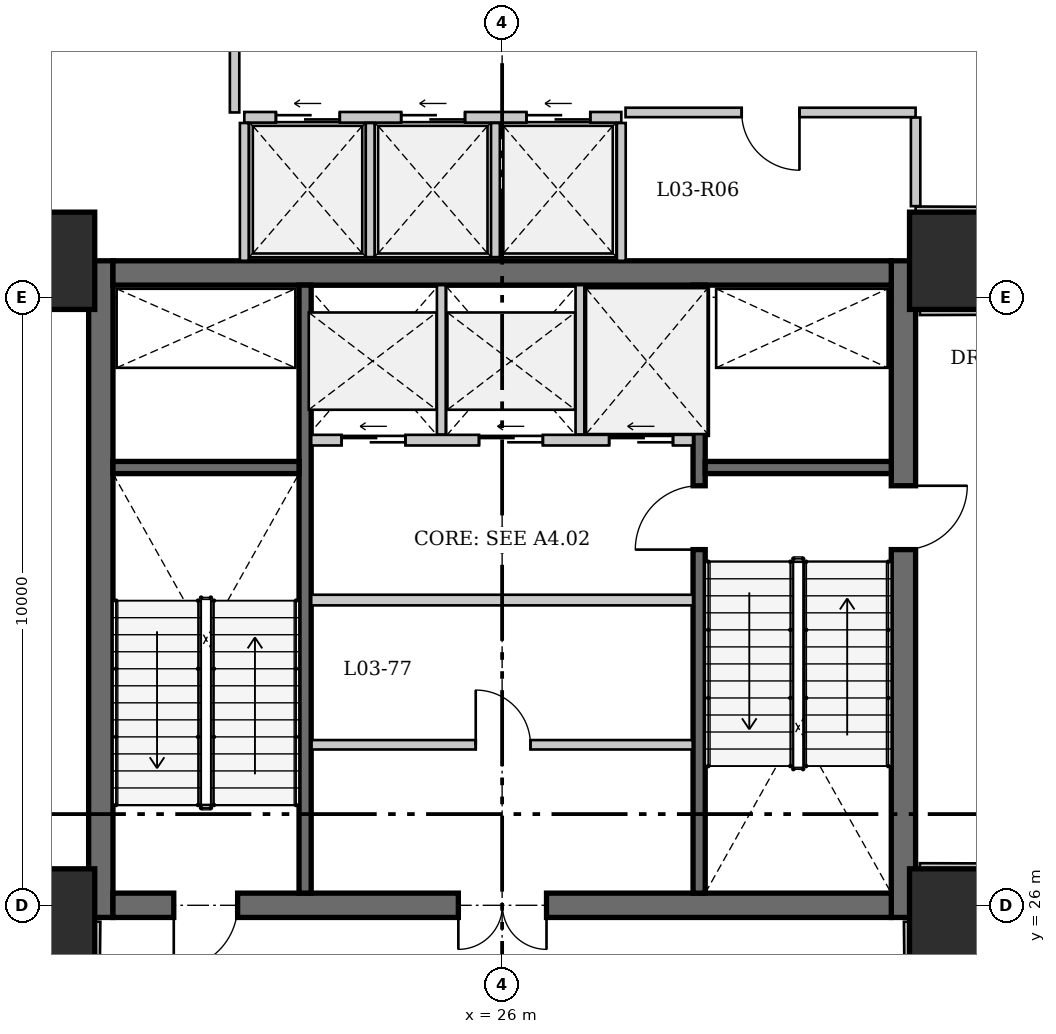
"""IFC4 building model, lengths in metres.
Left out: names, types, materials, properties, quantities, classifications, styles, units other than length and angle.
Written with IfcOpenShell. Run it as: python <this file> out.ifc"""

import sys

from ifc_helpers import new_model, si_unit, direction, frame, frame_2d, origin, origin_2d, place, context, subcontext, project, spatial, rectangle, extrude, source, transform, mapped, element, fill, save


model = new_model("IFC4")
c1 = context("Model", 3, precision=1e-05, world=origin(), true_north=direction((0.0, 1.0)))
c2 = subcontext(c1, "Body", "Model", "MODEL_VIEW")
j1 = project(units=[si_unit("LENGTHUNIT", "METRE"), si_unit("PLANEANGLEUNIT", "RADIAN")], contexts=[c1])
p1 = place(None, origin())
s1 = spatial("IfcSite", under=j1, at=p1, CompositionType="ELEMENT")
p2 = place(p1, origin())
s2 = spatial("IfcBuilding", under=s1, at=p2, CompositionType="ELEMENT")
p3 = place(p2, frame((0.0, 0.0, 14.4)))
s3 = spatial("IfcBuildingStorey", under=s2, at=p3, CompositionType="ELEMENT", Elevation=14.4)
for number, where, z_axis, x_axis in (
    (1, (18.5, 25.8, 0.0), (0.0, 0.0, 1.0), (1.0, 0.0, 0.0)),
    (2, (18.5, 36.6, 0.0), (0.0, 0.0, 1.0), (1.0, 0.0, 0.0)),
    (3, (33.5, 25.8, 0.0), (0.0, 0.0, 1.0), (1.0, 0.0, 0.0)),
    (4, (33.5, 36.6, 0.0), (0.0, 0.0, 1.0), (1.0, 0.0, 0.0)),
):
    element("IfcColumn", number, at=place(p3, frame(where, z_axis=z_axis, x_axis=x_axis)), inside=s3, PredefinedType="COLUMN", context=c2, shape_type="SweptSolid", body=[
        extrude(rectangle(XDim=1.6, YDim=1.6, at=origin_2d()), origin(), (0.0, 0.0, 1.0), 4.25),
    ])
p4 = place(p3, frame((19.4, 25.8, 0.0), z_axis=(0.0, 0.0, 1.0), x_axis=(0.0, 1.0, 0.0)))
e5 = element("IfcWall", 5, at=p4, inside=s3, PredefinedType="SHEAR", context=c2, shape_type="SweptSolid", body=[
    extrude(rectangle(XDim=10.8, YDim=0.4, at=frame_2d((5.4, 0.0))), origin(), (0.0, 0.0, 1.0), 4.6),
])
p5 = place(p3, frame((32.6, 36.6, 0.0), z_axis=(0.0, 0.0, 1.0), x_axis=(0.0, -1.0, 0.0)))
e6 = element("IfcWall", 6, at=p5, inside=s3, PredefinedType="SHEAR", context=c2, shape_type="SweptSolid", body=[
    extrude(rectangle(XDim=10.8, YDim=0.4, at=frame_2d((5.4, 0.0))), origin(), (0.0, 0.0, 1.0), 4.6),
])
p6 = place(p5, frame((3.7, 0.0, 0.0)))
e7 = element("IfcOpeningElement", 7, at=p6, cuts=e6, PredefinedType="OPENING", context=c2, shape_type="SweptSolid", body=[
    extrude(rectangle(XDim=1.05, YDim=2.15, at=frame_2d((0.525, 1.075))), frame((0.0, 0.21, 0.0), z_axis=(0.0, -1.0, 0.0), x_axis=(1.0, 0.0, 0.0)), (0.0, 0.0, 1.0), 0.42),
])
p7 = place(p3, frame((19.6, 36.4, 0.0), z_axis=(0.0, 0.0, 1.0), x_axis=(1.0, 0.0, 0.0)))
e8 = element("IfcWall", 8, at=p7, inside=s3, PredefinedType="SHEAR", context=c2, shape_type="SweptSolid", body=[
    extrude(rectangle(XDim=12.8, YDim=0.4, at=frame_2d((6.4, 0.0))), origin(), (0.0, 0.0, 1.0), 4.6),
])
p8 = place(p3, frame((32.4, 26.0, 0.0), z_axis=(0.0, 0.0, 1.0), x_axis=(-1.0, 0.0, 0.0)))
e9 = element("IfcWall", 9, at=p8, inside=s3, PredefinedType="SHEAR", context=c2, shape_type="SweptSolid", body=[
    extrude(rectangle(XDim=12.8, YDim=0.4, at=frame_2d((6.4, 0.0))), origin(), (0.0, 0.0, 1.0), 4.6),
])
p9 = place(p8, frame((10.75, 0.0, 0.0)))
e10 = element("IfcOpeningElement", 10, at=p9, cuts=e9, PredefinedType="OPENING", context=c2, shape_type="SweptSolid", body=[
    extrude(rectangle(XDim=1.05, YDim=2.15, at=frame_2d((0.525, 1.075))), frame((0.0, 0.21, 0.0), z_axis=(0.0, -1.0, 0.0), x_axis=(1.0, 0.0, 0.0)), (0.0, 0.0, 1.0), 0.42),
])
p10 = place(p8, frame((5.67, 0.0, 0.0)))
e11 = element("IfcOpeningElement", 11, at=p10, cuts=e9, PredefinedType="OPENING", context=c2, shape_type="SweptSolid", body=[
    extrude(rectangle(XDim=1.45, YDim=2.2, at=frame_2d((0.725, 1.1))), frame((0.0, 0.21, 0.0), z_axis=(0.0, -1.0, 0.0), x_axis=(1.0, 0.0, 0.0)), (0.0, 0.0, 1.0), 0.42),
])
p11 = place(p3, frame((22.76, 26.2, 0.0), z_axis=(0.0, 0.0, 1.0), x_axis=(0.0, 1.0, 0.0)))
e12 = element("IfcWall", 12, at=p11, inside=s3, PredefinedType="SHEAR", context=c2, shape_type="SweptSolid", body=[
    extrude(rectangle(XDim=10.0, YDim=0.2, at=frame_2d((5.0, 0.0))), origin(), (0.0, 0.0, 1.0), 4.6),
])
p12 = place(p3, frame((29.24, 26.2, 0.0), z_axis=(0.0, 0.0, 1.0), x_axis=(0.0, 1.0, 0.0)))
e13 = element("IfcWall", 13, at=p12, inside=s3, PredefinedType="SHEAR", context=c2, shape_type="SweptSolid", body=[
    extrude(rectangle(XDim=10.0, YDim=0.2, at=frame_2d((5.0, 0.0))), origin(), (0.0, 0.0, 1.0), 4.6),
])
p13 = place(p12, frame((5.65, 0.0, 0.0)))
e14 = element("IfcOpeningElement", 14, at=p13, cuts=e13, PredefinedType="OPENING", context=c2, shape_type="SweptSolid", body=[
    extrude(rectangle(XDim=1.05, YDim=2.15, at=frame_2d((0.525, 1.075))), frame((0.0, 0.11, 0.0), z_axis=(0.0, -1.0, 0.0), x_axis=(1.0, 0.0, 0.0)), (0.0, 0.0, 1.0), 0.22),
])
for number, where, z_axis, x_axis in (
    (15, (19.6, 33.2, 0.0), (0.0, 0.0, 1.0), (1.0, 0.0, 0.0)),
    (16, (29.34, 33.2, 0.0), (0.0, 0.0, 1.0), (1.0, 0.0, 0.0)),
):
    element("IfcWall", number, at=place(p3, frame(where, z_axis=z_axis, x_axis=x_axis)), inside=s3, PredefinedType="SHEAR", context=c2, shape_type="SweptSolid", body=[
        extrude(rectangle(XDim=3.06, YDim=0.2, at=frame_2d((1.53, 0.0))), origin(), (0.0, 0.0, 1.0), 4.6),
    ])
p14 = place(p3, frame((22.86, 33.65, 0.0), z_axis=(0.0, 0.0, 1.0), x_axis=(1.0, 0.0, 0.0)))
e17 = element("IfcWall", 17, at=p14, inside=s3, PredefinedType="SOLIDWALL", context=c2, shape_type="SweptSolid", body=[
    extrude(rectangle(XDim=6.28, YDim=0.175, at=frame_2d((3.14, 0.0))), origin(), (0.0, 0.0, 1.0), 4.25),
])
p15 = place(p14, frame((0.5, 0.0, 0.0)))
e18 = element("IfcOpeningElement", 18, at=p15, cuts=e17, PredefinedType="OPENING", context=c2, shape_type="SweptSolid", body=[
    extrude(rectangle(XDim=1.05, YDim=2.15, at=frame_2d((0.525, 1.075))), frame((0.0, 0.098, 0.0), z_axis=(0.0, -1.0, 0.0), x_axis=(1.0, 0.0, 0.0)), (0.0, 0.0, 1.0), 0.195),
])
p16 = place(p14, frame((2.76, 0.0, 0.0)))
e19 = element("IfcOpeningElement", 19, at=p16, cuts=e17, PredefinedType="OPENING", context=c2, shape_type="SweptSolid", body=[
    extrude(rectangle(XDim=1.05, YDim=2.15, at=frame_2d((0.525, 1.075))), frame((0.0, 0.098, 0.0), z_axis=(0.0, -1.0, 0.0), x_axis=(1.0, 0.0, 0.0)), (0.0, 0.0, 1.0), 0.195),
])
p17 = place(p14, frame((4.9, 0.0, 0.0)))
e20 = element("IfcOpeningElement", 20, at=p17, cuts=e17, PredefinedType="OPENING", context=c2, shape_type="SweptSolid", body=[
    extrude(rectangle(XDim=1.05, YDim=2.15, at=frame_2d((0.525, 1.075))), frame((0.0, 0.098, 0.0), z_axis=(0.0, -1.0, 0.0), x_axis=(1.0, 0.0, 0.0)), (0.0, 0.0, 1.0), 0.195),
])
for number, where, z_axis, x_axis in (
    (21, (25.0, 33.743, 0.0), (0.0, 0.0, 1.0), (0.0, 1.0, 0.0)),
    (22, (27.28, 33.743, 0.0), (0.0, 0.0, 1.0), (0.0, 1.0, 0.0)),
):
    element("IfcWall", number, at=place(p3, frame(where, z_axis=z_axis, x_axis=x_axis)), inside=s3, PredefinedType="SOLIDWALL", context=c2, shape_type="SweptSolid", body=[
        extrude(rectangle(XDim=2.457, YDim=0.145, at=frame_2d((1.228, 0.0))), origin(), (0.0, 0.0, 1.0), 4.25),
    ])
p18 = place(p3, frame((22.86, 31.02, 0.0), z_axis=(0.0, 0.0, 1.0), x_axis=(1.0, 0.0, 0.0)))
e23 = element("IfcWall", 23, at=p18, inside=s3, PredefinedType="SOLIDWALL", context=c2, shape_type="SweptSolid", body=[
    extrude(rectangle(XDim=6.28, YDim=0.175, at=frame_2d((3.14, 0.0))), origin(), (0.0, 0.0, 1.0), 4.25),
])
p19 = place(p3, frame((22.866, 28.64, 0.0), z_axis=(0.0, 0.0, 1.0), x_axis=(1.0, 0.0, 0.0)))
e24 = element("IfcWall", 24, at=p19, inside=s3, PredefinedType="PARTITIONING", context=c2, shape_type="SweptSolid", body=[
    extrude(rectangle(XDim=6.268, YDim=0.155, at=frame_2d((3.134, 0.0))), origin(), (0.0, 0.0, 1.0), 4.25),
])
p20 = place(p19, frame((2.7, 0.0, 0.0)))
e25 = element("IfcOpeningElement", 25, at=p20, cuts=e24, PredefinedType="OPENING", context=c2, shape_type="SweptSolid", body=[
    extrude(rectangle(XDim=0.9, YDim=2.1, at=frame_2d((0.45, 1.05))), frame((0.0, 0.087, 0.0), z_axis=(0.0, -1.0, 0.0), x_axis=(1.0, 0.0, 0.0)), (0.0, 0.0, 1.0), 0.175),
])
p21 = place(p3, frame((21.76, 38.96, 0.0), z_axis=(0.0, 0.0, 1.0), x_axis=(1.0, 0.0, 0.0)))
e26 = element("IfcWall", 26, at=p21, inside=s3, PredefinedType="SOLIDWALL", context=c2, shape_type="SweptSolid", body=[
    extrude(rectangle(XDim=6.2, YDim=0.175, at=frame_2d((3.1, 0.0))), origin(), (0.0, 0.0, 1.0), 4.25),
])
p22 = place(p21, frame((0.52, 0.0, 0.0)))
e27 = element("IfcOpeningElement", 27, at=p22, cuts=e26, PredefinedType="OPENING", context=c2, shape_type="SweptSolid", body=[
    extrude(rectangle(XDim=1.05, YDim=2.15, at=frame_2d((0.525, 1.075))), frame((0.0, 0.098, 0.0), z_axis=(0.0, -1.0, 0.0), x_axis=(1.0, 0.0, 0.0)), (0.0, 0.0, 1.0), 0.195),
])
p23 = place(p21, frame((2.58, 0.0, 0.0)))
e28 = element("IfcOpeningElement", 28, at=p23, cuts=e26, PredefinedType="OPENING", context=c2, shape_type="SweptSolid", body=[
    extrude(rectangle(XDim=1.05, YDim=2.15, at=frame_2d((0.525, 1.075))), frame((0.0, 0.098, 0.0), z_axis=(0.0, -1.0, 0.0), x_axis=(1.0, 0.0, 0.0)), (0.0, 0.0, 1.0), 0.195),
])
p24 = place(p21, frame((4.64, 0.0, 0.0)))
e29 = element("IfcOpeningElement", 29, at=p24, cuts=e26, PredefinedType="OPENING", context=c2, shape_type="SweptSolid", body=[
    extrude(rectangle(XDim=1.05, YDim=2.15, at=frame_2d((0.525, 1.075))), frame((0.0, 0.098, 0.0), z_axis=(0.0, -1.0, 0.0), x_axis=(1.0, 0.0, 0.0)), (0.0, 0.0, 1.0), 0.195),
])
for number, where, z_axis, x_axis in (
    (30, (21.76, 36.6, 0.0), (0.0, 0.0, 1.0), (0.0, 1.0, 0.0)),
    (31, (27.96, 36.6, 0.0), (0.0, 0.0, 1.0), (0.0, 1.0, 0.0)),
):
    element("IfcWall", number, at=place(p3, frame(where, z_axis=z_axis, x_axis=x_axis)), inside=s3, PredefinedType="SOLIDWALL", context=c2, shape_type="SweptSolid", body=[
        extrude(rectangle(XDim=2.266, YDim=0.145, at=frame_2d((1.133, 0.0))), origin(), (0.0, 0.0, 1.0), 4.25),
    ])
for number, where, z_axis, x_axis in (
    (32, (23.83, 36.66, 0.0), (0.0, 0.0, 1.0), (0.0, 1.0, 0.0)),
    (33, (25.89, 36.66, 0.0), (0.0, 0.0, 1.0), (0.0, 1.0, 0.0)),
):
    element("IfcWall", number, at=place(p3, frame(where, z_axis=z_axis, x_axis=x_axis)), inside=s3, PredefinedType="SOLIDWALL", context=c2, shape_type="SweptSolid", body=[
        extrude(rectangle(XDim=2.207, YDim=0.145, at=frame_2d((1.103, 0.0))), origin(), (0.0, 0.0, 1.0), 4.25),
    ])
p25 = place(p3, frame((32.8, 39.04, 0.0), z_axis=(0.0, 0.0, 1.0), x_axis=(-1.0, 0.0, 0.0)))
e34 = element("IfcWall", 34, at=p25, inside=s3, PredefinedType="PARTITIONING", context=c2, shape_type="SweptSolid", body=[
    extrude(rectangle(XDim=4.77, YDim=0.155, at=frame_2d((2.385, 0.0))), origin(), (0.0, 0.0, 1.0), 4.25),
])
p26 = place(p25, frame((1.91, 0.0, 0.0)))
e35 = element("IfcOpeningElement", 35, at=p26, cuts=e34, PredefinedType="OPENING", context=c2, shape_type="SweptSolid", body=[
    extrude(rectangle(XDim=0.95, YDim=2.15, at=frame_2d((0.475, 1.075))), frame((0.0, 0.087, 0.0), z_axis=(0.0, -1.0, 0.0), x_axis=(1.0, 0.0, 0.0)), (0.0, 0.0, 1.0), 0.175),
])
p27 = place(p3, frame((19.308, 25.07, 0.0), z_axis=(0.0, 0.0, 1.0), x_axis=(0.010362137944, 0.999946311607, 0.0)))
e36 = element("IfcWall", 36, at=p27, inside=s3, PredefinedType="PARTITIONING", context=c2, shape_type="SweptSolid", body=[
    extrude(rectangle(XDim=0.66, YDim=0.155, at=frame_2d((0.33, 0.0))), origin(), (0.0, 0.0, 1.0), 4.25),
])
p28 = place(p3, frame((32.685, 25.73, 0.0), z_axis=(0.0, 0.0, 1.0), x_axis=(0.010511902743, -0.999944748424, 0.0)))
e37 = element("IfcWall", 37, at=p28, inside=s3, PredefinedType="PARTITIONING", context=c2, shape_type="SweptSolid", body=[
    extrude(rectangle(XDim=0.743, YDim=0.155, at=frame_2d((0.372, 0.0))), origin(), (0.0, 0.0, 1.0), 4.25),
])
p29 = place(p3, frame((34.227, 26.611, 0.0), z_axis=(0.0, 0.0, 1.0), x_axis=(-0.999995856473, 0.002878721429, 0.0)))
e38 = element("IfcWall", 38, at=p29, inside=s3, PredefinedType="PARTITIONING", context=c2, shape_type="SweptSolid", body=[
    extrude(rectangle(XDim=1.357, YDim=0.155, at=frame_2d((0.678, 0.0))), origin(), (0.0, 0.0, 1.0), 4.25),
])
p30 = place(p3, frame((32.87, 35.785, 0.0), z_axis=(0.0, 0.0, 1.0), x_axis=(0.99999584892, 0.002881343971, 0.0)))
e39 = element("IfcWall", 39, at=p30, inside=s3, PredefinedType="PARTITIONING", context=c2, shape_type="SweptSolid", body=[
    extrude(rectangle(XDim=1.44, YDim=0.155, at=frame_2d((0.72, 0.0))), origin(), (0.0, 0.0, 1.0), 4.25),
])
p31 = place(p3, frame((34.228, 37.41, 0.0), z_axis=(0.0, 0.0, 1.0), x_axis=(-0.999993554729, 0.003590334185, 0.0)))
e40 = element("IfcWall", 40, at=p31, inside=s3, PredefinedType="PARTITIONING", context=c2, shape_type="SweptSolid", body=[
    extrude(rectangle(XDim=1.428, YDim=0.155, at=frame_2d((0.714, 0.0))), origin(), (0.0, 0.0, 1.0), 4.25),
])
p32 = place(p3, frame((32.8, 37.499, 0.0), z_axis=(0.0, 0.0, 1.0), x_axis=(0.0, 1.0, 0.0)))
e41 = element("IfcWall", 41, at=p32, inside=s3, PredefinedType="PARTITIONING", context=c2, shape_type="SweptSolid", body=[
    extrude(rectangle(XDim=1.458, YDim=0.155, at=frame_2d((0.729, 0.0))), origin(), (0.0, 0.0, 1.0), 4.25),
])
p33 = place(p3, frame((21.6, 39.04, 0.0), z_axis=(0.0, 0.0, 1.0), x_axis=(0.0, 1.0, 0.0)))
e42 = element("IfcWall", 42, at=p33, inside=s3, PredefinedType="PARTITIONING", context=c2, shape_type="SweptSolid", body=[
    extrude(rectangle(XDim=1.96, YDim=0.155, at=frame_2d((0.98, 0.0))), origin(), (0.0, 0.0, 1.0), 4.25),
])
m1 = source(origin(), c2, "Body", "SweptSolid", [
    extrude(rectangle(XDim=1.05, YDim=2.15, at=frame_2d((0.525, 1.075))), frame((0.0, 0.025, 0.0), z_axis=(0.0, -1.0, 0.0), x_axis=(1.0, 0.0, 0.0)), (0.0, 0.0, 1.0), 0.05),
])
p34 = place(p9, origin())
e43 = element("IfcDoor", 43, at=p34, inside=s3, OperationType="SINGLE_SWING_RIGHT", PredefinedType="DOOR", context=c2, shape_type="MappedRepresentation", body=[
    mapped(m1, transform((0.0, 0.0, 0.0), x_axis=(1.0, 0.0, 0.0), y_axis=(0.0, 1.0, 0.0), z_axis=(0.0, 0.0, 1.0), scale=1.0)),
])
fill(e10, e43)
m2 = source(origin(), c2, "Body", "SweptSolid", [
    extrude(rectangle(XDim=1.45, YDim=2.2, at=frame_2d((0.725, 1.1))), frame((0.0, 0.025, 0.0), z_axis=(0.0, -1.0, 0.0), x_axis=(1.0, 0.0, 0.0)), (0.0, 0.0, 1.0), 0.05),
])
p35 = place(p10, origin())
e44 = element("IfcDoor", 44, at=p35, inside=s3, OperationType="DOUBLE_DOOR_SINGLE_SWING", PredefinedType="DOOR", context=c2, shape_type="MappedRepresentation", body=[
    mapped(m2, transform((0.0, 0.0, 0.0), x_axis=(1.0, 0.0, 0.0), y_axis=(0.0, 1.0, 0.0), z_axis=(0.0, 0.0, 1.0), scale=1.0)),
])
fill(e11, e44)
p36 = place(p6, origin())
e45 = element("IfcDoor", 45, at=p36, inside=s3, OperationType="SINGLE_SWING_LEFT", PredefinedType="DOOR", context=c2, shape_type="MappedRepresentation", body=[
    mapped(m1, transform((0.0, 0.0, 0.0), x_axis=(1.0, 0.0, 0.0), y_axis=(0.0, 1.0, 0.0), z_axis=(0.0, 0.0, 1.0), scale=1.0)),
])
fill(e7, e45)
p37 = place(p13, origin())
e46 = element("IfcDoor", 46, at=p37, inside=s3, OperationType="SINGLE_SWING_LEFT", PredefinedType="DOOR", context=c2, shape_type="MappedRepresentation", body=[
    mapped(m1, transform((0.0, 0.0, 0.0), x_axis=(1.0, 0.0, 0.0), y_axis=(0.0, 1.0, 0.0), z_axis=(0.0, 0.0, 1.0), scale=1.0)),
])
fill(e14, e46)
m3 = source(origin(), c2, "Body", "SweptSolid", [
    extrude(rectangle(XDim=1.05, YDim=2.15, at=frame_2d((0.525, 1.075))), frame((0.0, 0.025, 0.0), z_axis=(0.0, -1.0, 0.0), x_axis=(1.0, 0.0, 0.0)), (0.0, 0.0, 1.0), 0.05),
])
p38 = place(p15, origin())
e47 = element("IfcDoor", 47, at=p38, inside=s3, OperationType="SLIDING_TO_LEFT", PredefinedType="DOOR", context=c2, shape_type="MappedRepresentation", body=[
    mapped(m3, transform((0.0, 0.0, 0.0), x_axis=(1.0, 0.0, 0.0), y_axis=(0.0, 1.0, 0.0), z_axis=(0.0, 0.0, 1.0), scale=1.0)),
])
fill(e18, e47)
p39 = place(p16, origin())
e48 = element("IfcDoor", 48, at=p39, inside=s3, OperationType="SLIDING_TO_LEFT", PredefinedType="DOOR", context=c2, shape_type="MappedRepresentation", body=[
    mapped(m3, transform((0.0, 0.0, 0.0), x_axis=(1.0, 0.0, 0.0), y_axis=(0.0, 1.0, 0.0), z_axis=(0.0, 0.0, 1.0), scale=1.0)),
])
fill(e19, e48)
p40 = place(p17, origin())
e49 = element("IfcDoor", 49, at=p40, inside=s3, OperationType="SLIDING_TO_LEFT", PredefinedType="DOOR", context=c2, shape_type="MappedRepresentation", body=[
    mapped(m3, transform((0.0, 0.0, 0.0), x_axis=(1.0, 0.0, 0.0), y_axis=(0.0, 1.0, 0.0), z_axis=(0.0, 0.0, 1.0), scale=1.0)),
])
fill(e20, e49)
m4 = source(origin(), c2, "Body", "SweptSolid", [
    extrude(rectangle(XDim=0.9, YDim=2.1, at=frame_2d((0.45, 1.05))), frame((0.0, 0.025, 0.0), z_axis=(0.0, -1.0, 0.0), x_axis=(1.0, 0.0, 0.0)), (0.0, 0.0, 1.0), 0.05),
])
p41 = place(p20, origin())
e50 = element("IfcDoor", 50, at=p41, inside=s3, OperationType="SINGLE_SWING_LEFT", PredefinedType="DOOR", context=c2, shape_type="MappedRepresentation", body=[
    mapped(m4, transform((0.0, 0.0, 0.0), x_axis=(1.0, 0.0, 0.0), y_axis=(0.0, 1.0, 0.0), z_axis=(0.0, 0.0, 1.0), scale=1.0)),
])
fill(e25, e50)
p42 = place(p22, origin())
e51 = element("IfcDoor", 51, at=p42, inside=s3, OperationType="SLIDING_TO_LEFT", PredefinedType="DOOR", context=c2, shape_type="MappedRepresentation", body=[
    mapped(m3, transform((0.0, 0.0, 0.0), x_axis=(1.0, 0.0, 0.0), y_axis=(0.0, 1.0, 0.0), z_axis=(0.0, 0.0, 1.0), scale=1.0)),
])
fill(e27, e51)
p43 = place(p23, origin())
e52 = element("IfcDoor", 52, at=p43, inside=s3, OperationType="SLIDING_TO_LEFT", PredefinedType="DOOR", context=c2, shape_type="MappedRepresentation", body=[
    mapped(m3, transform((0.0, 0.0, 0.0), x_axis=(1.0, 0.0, 0.0), y_axis=(0.0, 1.0, 0.0), z_axis=(0.0, 0.0, 1.0), scale=1.0)),
])
fill(e28, e52)
p44 = place(p24, origin())
e53 = element("IfcDoor", 53, at=p44, inside=s3, OperationType="SLIDING_TO_LEFT", PredefinedType="DOOR", context=c2, shape_type="MappedRepresentation", body=[
    mapped(m3, transform((0.0, 0.0, 0.0), x_axis=(1.0, 0.0, 0.0), y_axis=(0.0, 1.0, 0.0), z_axis=(0.0, 0.0, 1.0), scale=1.0)),
])
fill(e29, e53)
m5 = source(origin(), c2, "Body", "SweptSolid", [
    extrude(rectangle(XDim=0.95, YDim=2.15, at=frame_2d((0.475, 1.075))), frame((0.0, 0.025, 0.0), z_axis=(0.0, -1.0, 0.0), x_axis=(1.0, 0.0, 0.0)), (0.0, 0.0, 1.0), 0.05),
])
p45 = place(p26, origin())
e54 = element("IfcDoor", 54, at=p45, inside=s3, OperationType="SINGLE_SWING_LEFT", PredefinedType="DOOR", context=c2, shape_type="MappedRepresentation", body=[
    mapped(m5, transform((0.0, 0.0, 0.0), x_axis=(1.0, 0.0, 0.0), y_axis=(0.0, 1.0, 0.0), z_axis=(0.0, 0.0, 1.0), scale=1.0)),
])
fill(e35, e54)
save(model, sys.argv[1])
